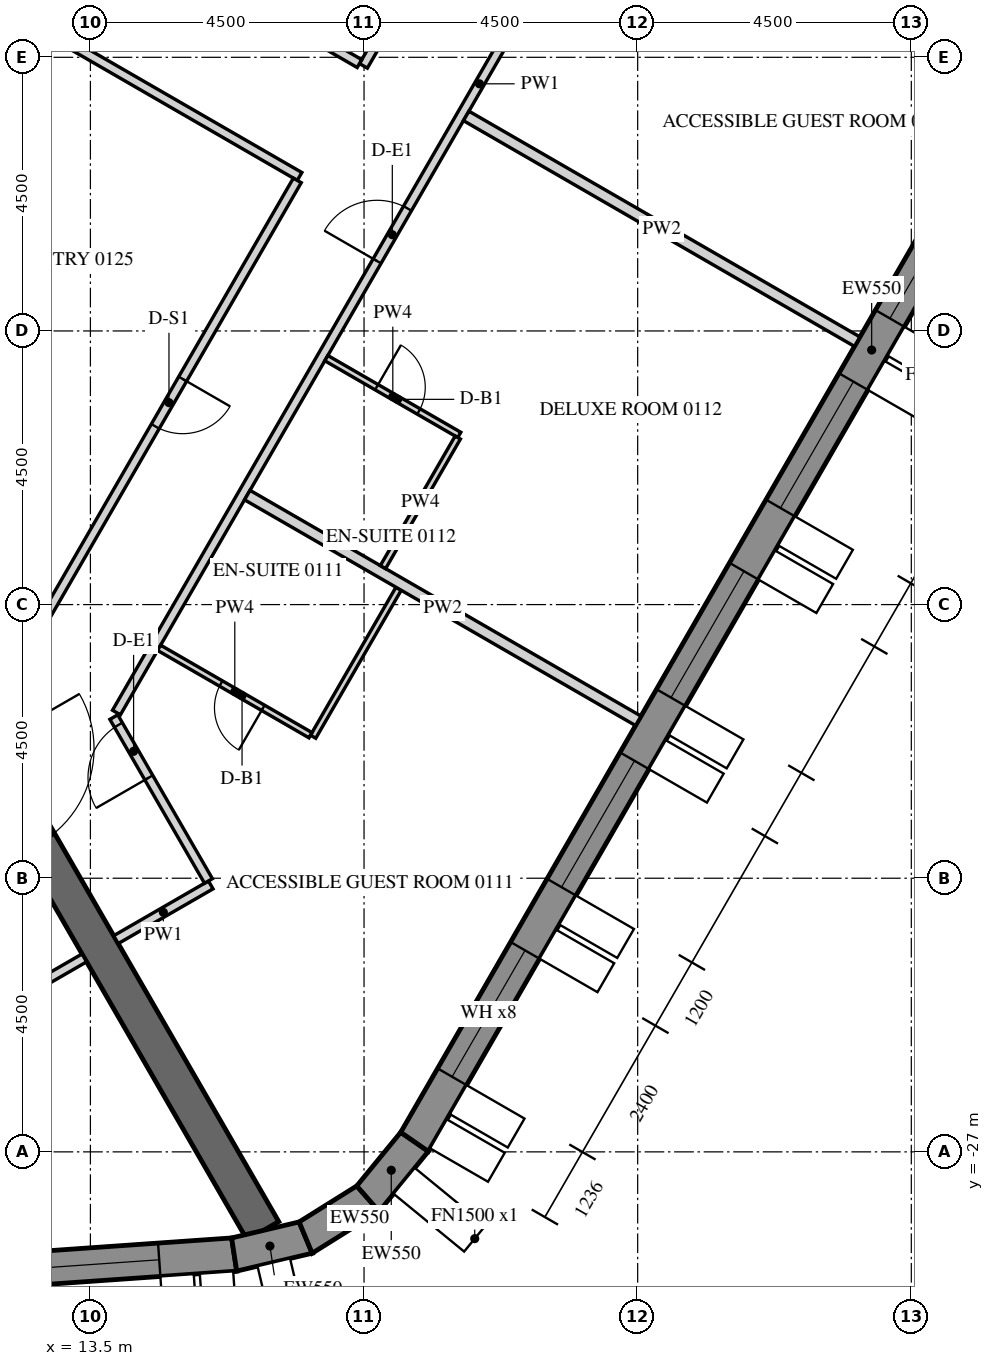
"""IFC4 building model, lengths in metres.
Left out: names, types, materials, properties, quantities, classifications, styles, units other than length and angle.
Written with IfcOpenShell. Run it as: python <this file> out.ifc"""

import sys

from ifc_helpers import new_model, si_unit, direction, frame, frame_2d, origin, place, context, subcontext, project, spatial, polyline, rectangle, outline, extrude, element, fill, save


model = new_model("IFC4")
c1 = context("Model", 3, precision=1e-05, world=origin(), true_north=direction((0.0, 1.0)))
c2 = subcontext(c1, "Body", "Model", "MODEL_VIEW")
j1 = project(units=[si_unit("LENGTHUNIT", "METRE"), si_unit("PLANEANGLEUNIT", "RADIAN")], contexts=[c1])
p1 = place(None, origin())
s1 = spatial("IfcSite", under=j1, at=p1, CompositionType="ELEMENT")
p2 = place(p1, origin())
s2 = spatial("IfcBuilding", under=s1, at=p2, CompositionType="ELEMENT")
p3 = place(p2, frame((0.0, 0.0, 37.5)))
s3 = spatial("IfcBuildingStorey", under=s2, at=p3, CompositionType="ELEMENT", Elevation=37.5)
p4 = place(p3, frame((-14.134, -30.786, -0.15), z_axis=(0.0, 0.0, 1.0), x_axis=(0.997564037441, 0.069756657061, 0.0)))
e1 = element("IfcWall", 1, at=p4, inside=s3, PredefinedType="SOLIDWALL", context=c2, shape_type="SweptSolid", body=[
    extrude(outline(polyline([(-0.026, -0.275), (30.094, -0.275), (30.049, 0.275), (0.026, 0.275), (-0.026, -0.275)])), origin(), (0.0, 0.0, 1.0), 3.9),
])
p5 = place(p4, frame((1.236, 0.0, 1.05)))
e2 = element("IfcOpeningElement", 2, at=p5, cuts=e1, PredefinedType="OPENING", context=c2, shape_type="SweptSolid", body=[
    extrude(rectangle(XDim=2.4, YDim=2.4, at=frame_2d((1.2, 1.2))), frame((0.0, 0.285, 0.0), z_axis=(0.0, -1.0, 0.0), x_axis=(1.0, 0.0, 0.0)), (0.0, 0.0, 1.0), 0.57),
])
p6 = place(p4, frame((4.835, 0.0, 1.05)))
e3 = element("IfcOpeningElement", 3, at=p6, cuts=e1, PredefinedType="OPENING", context=c2, shape_type="SweptSolid", body=[
    extrude(rectangle(XDim=2.4, YDim=2.4, at=frame_2d((1.2, 1.2))), frame((0.0, 0.285, 0.0), z_axis=(0.0, -1.0, 0.0), x_axis=(1.0, 0.0, 0.0)), (0.0, 0.0, 1.0), 0.57),
])
p7 = place(p4, frame((8.436, 0.0, 1.05)))
e4 = element("IfcOpeningElement", 4, at=p7, cuts=e1, PredefinedType="OPENING", context=c2, shape_type="SweptSolid", body=[
    extrude(rectangle(XDim=2.4, YDim=2.4, at=frame_2d((1.2, 1.2))), frame((0.0, 0.285, 0.0), z_axis=(0.0, -1.0, 0.0), x_axis=(1.0, 0.0, 0.0)), (0.0, 0.0, 1.0), 0.57),
])
p8 = place(p4, frame((12.035, 0.0, 1.05)))
e5 = element("IfcOpeningElement", 5, at=p8, cuts=e1, PredefinedType="OPENING", context=c2, shape_type="SweptSolid", body=[
    extrude(rectangle(XDim=2.4, YDim=2.4, at=frame_2d((1.2, 1.2))), frame((0.0, 0.285, 0.0), z_axis=(0.0, -1.0, 0.0), x_axis=(1.0, 0.0, 0.0)), (0.0, 0.0, 1.0), 0.57),
])
p9 = place(p4, frame((15.635, 0.0, 1.05)))
e6 = element("IfcOpeningElement", 6, at=p9, cuts=e1, PredefinedType="OPENING", context=c2, shape_type="SweptSolid", body=[
    extrude(rectangle(XDim=2.4, YDim=2.4, at=frame_2d((1.2, 1.2))), frame((0.0, 0.285, 0.0), z_axis=(0.0, -1.0, 0.0), x_axis=(1.0, 0.0, 0.0)), (0.0, 0.0, 1.0), 0.57),
])
p10 = place(p4, frame((19.236, 0.0, 1.05)))
e7 = element("IfcOpeningElement", 7, at=p10, cuts=e1, PredefinedType="OPENING", context=c2, shape_type="SweptSolid", body=[
    extrude(rectangle(XDim=2.4, YDim=2.4, at=frame_2d((1.2, 1.2))), frame((0.0, 0.285, 0.0), z_axis=(0.0, -1.0, 0.0), x_axis=(1.0, 0.0, 0.0)), (0.0, 0.0, 1.0), 0.57),
])
p11 = place(p4, frame((22.835, 0.0, 1.05)))
e8 = element("IfcOpeningElement", 8, at=p11, cuts=e1, PredefinedType="OPENING", context=c2, shape_type="SweptSolid", body=[
    extrude(rectangle(XDim=2.4, YDim=2.4, at=frame_2d((1.2, 1.2))), frame((0.0, 0.285, 0.0), z_axis=(0.0, -1.0, 0.0), x_axis=(1.0, 0.0, 0.0)), (0.0, 0.0, 1.0), 0.57),
])
p12 = place(p4, frame((26.436, 0.0, 1.05)))
e9 = element("IfcOpeningElement", 9, at=p12, cuts=e1, PredefinedType="OPENING", context=c2, shape_type="SweptSolid", body=[
    extrude(rectangle(XDim=2.4, YDim=2.4, at=frame_2d((1.2, 1.2))), frame((0.0, 0.285, 0.0), z_axis=(0.0, -1.0, 0.0), x_axis=(1.0, 0.0, 0.0)), (0.0, 0.0, 1.0), 0.57),
])
p13 = place(p3, frame((15.864, -28.688, -0.15), z_axis=(0.0, 0.0, 1.0), x_axis=(0.973063591128, 0.230536868247, 0.0)))
e10 = element("IfcWall", 10, at=p13, inside=s3, PredefinedType="SOLIDWALL", context=c2, shape_type="SweptSolid", body=[
    extrude(outline(polyline([(-0.022, -0.275), (1.253, -0.275), (1.163, 0.275), (0.022, 0.275), (-0.022, -0.275)])), origin(), (0.0, 0.0, 1.0), 3.9),
])
p14 = place(p3, frame((17.04, -28.41, -0.15), z_axis=(0.0, 0.0, 1.0), x_axis=(0.847952888306, 0.530071598195, 0.0)))
e11 = element("IfcWall", 11, at=p14, inside=s3, PredefinedType="SOLIDWALL", context=c2, shape_type="SweptSolid", body=[
    extrude(outline(polyline([(-0.045, -0.275), (1.253, -0.275), (1.163, 0.275), (0.045, 0.275), (-0.045, -0.275)])), origin(), (0.0, 0.0, 1.0), 3.9),
])
p15 = place(p3, frame((18.064, -27.769, -0.15), z_axis=(0.0, 0.0, 1.0), x_axis=(0.633842757806, 0.773461930787, 0.0)))
e12 = element("IfcWall", 12, at=p15, inside=s3, PredefinedType="SOLIDWALL", context=c2, shape_type="SweptSolid", body=[
    extrude(outline(polyline([(-0.045, -0.275), (1.231, -0.275), (1.186, 0.275), (0.045, 0.275), (-0.045, -0.275)])), origin(), (0.0, 0.0, 1.0), 3.9),
])
p16 = place(p3, frame((18.83, -26.835, -0.15), z_axis=(0.0, 0.0, 1.0), x_axis=(0.500003800416, 0.866023209602, 0.0)))
e13 = element("IfcWall", 13, at=p16, inside=s3, PredefinedType="SOLIDWALL", context=c2, shape_type="SweptSolid", body=[
    extrude(outline(polyline([(-0.022, -0.275), (30.097, -0.275), (30.045, 0.275), (0.022, 0.275), (-0.022, -0.275)])), origin(), (0.0, 0.0, 1.0), 3.9),
])
p17 = place(p16, frame((1.236, 0.0, 1.05)))
e14 = element("IfcOpeningElement", 14, at=p17, cuts=e13, PredefinedType="OPENING", context=c2, shape_type="SweptSolid", body=[
    extrude(rectangle(XDim=2.4, YDim=2.4, at=frame_2d((1.2, 1.2))), frame((0.0, 0.285, 0.0), z_axis=(0.0, -1.0, 0.0), x_axis=(1.0, 0.0, 0.0)), (0.0, 0.0, 1.0), 0.57),
])
p18 = place(p16, frame((4.835, 0.0, 1.05)))
e15 = element("IfcOpeningElement", 15, at=p18, cuts=e13, PredefinedType="OPENING", context=c2, shape_type="SweptSolid", body=[
    extrude(rectangle(XDim=2.4, YDim=2.4, at=frame_2d((1.2, 1.2))), frame((0.0, 0.285, 0.0), z_axis=(0.0, -1.0, 0.0), x_axis=(1.0, 0.0, 0.0)), (0.0, 0.0, 1.0), 0.57),
])
p19 = place(p16, frame((8.436, 0.0, 1.05)))
e16 = element("IfcOpeningElement", 16, at=p19, cuts=e13, PredefinedType="OPENING", context=c2, shape_type="SweptSolid", body=[
    extrude(rectangle(XDim=2.4, YDim=2.4, at=frame_2d((1.2, 1.2))), frame((0.0, 0.285, 0.0), z_axis=(0.0, -1.0, 0.0), x_axis=(1.0, 0.0, 0.0)), (0.0, 0.0, 1.0), 0.57),
])
p20 = place(p16, frame((12.035, 0.0, 1.05)))
e17 = element("IfcOpeningElement", 17, at=p20, cuts=e13, PredefinedType="OPENING", context=c2, shape_type="SweptSolid", body=[
    extrude(rectangle(XDim=2.4, YDim=2.4, at=frame_2d((1.2, 1.2))), frame((0.0, 0.285, 0.0), z_axis=(0.0, -1.0, 0.0), x_axis=(1.0, 0.0, 0.0)), (0.0, 0.0, 1.0), 0.57),
])
p21 = place(p16, frame((15.635, 0.0, 1.05)))
e18 = element("IfcOpeningElement", 18, at=p21, cuts=e13, PredefinedType="OPENING", context=c2, shape_type="SweptSolid", body=[
    extrude(rectangle(XDim=2.4, YDim=2.4, at=frame_2d((1.2, 1.2))), frame((0.0, 0.285, 0.0), z_axis=(0.0, -1.0, 0.0), x_axis=(1.0, 0.0, 0.0)), (0.0, 0.0, 1.0), 0.57),
])
p22 = place(p16, frame((19.236, 0.0, 1.05)))
e19 = element("IfcOpeningElement", 19, at=p22, cuts=e13, PredefinedType="OPENING", context=c2, shape_type="SweptSolid", body=[
    extrude(rectangle(XDim=2.4, YDim=2.4, at=frame_2d((1.2, 1.2))), frame((0.0, 0.285, 0.0), z_axis=(0.0, -1.0, 0.0), x_axis=(1.0, 0.0, 0.0)), (0.0, 0.0, 1.0), 0.57),
])
p23 = place(p16, frame((22.835, 0.0, 1.05)))
e20 = element("IfcOpeningElement", 20, at=p23, cuts=e13, PredefinedType="OPENING", context=c2, shape_type="SweptSolid", body=[
    extrude(rectangle(XDim=2.4, YDim=2.4, at=frame_2d((1.2, 1.2))), frame((0.0, 0.285, 0.0), z_axis=(0.0, -1.0, 0.0), x_axis=(1.0, 0.0, 0.0)), (0.0, 0.0, 1.0), 0.57),
])
p24 = place(p16, frame((26.436, 0.0, 1.05)))
e21 = element("IfcOpeningElement", 21, at=p24, cuts=e13, PredefinedType="OPENING", context=c2, shape_type="SweptSolid", body=[
    extrude(rectangle(XDim=2.4, YDim=2.4, at=frame_2d((1.2, 1.2))), frame((0.0, 0.285, 0.0), z_axis=(0.0, -1.0, 0.0), x_axis=(1.0, 0.0, 0.0)), (0.0, 0.0, 1.0), 0.57),
])
p25 = place(p3, frame((7.91, -13.7, -0.15), z_axis=(0.0, 0.0, 1.0), x_axis=(0.499999880136, 0.866025472988, 0.0)))
e22 = element("IfcWall", 22, at=p25, inside=s3, PredefinedType="SHEAR", context=c2, shape_type="SweptSolid", body=[
    extrude(outline(polyline([(-0.173, -0.3), (15.993, -0.3), (15.646, 0.3), (0.173, 0.3), (-0.173, -0.3)])), origin(), (0.0, 0.0, 1.0), 3.9),
])
p26 = place(p25, frame((7.039, 0.0, 0.15)))
e23 = element("IfcOpeningElement", 23, at=p26, cuts=e22, PredefinedType="OPENING", context=c2, shape_type="SweptSolid", body=[
    extrude(rectangle(XDim=1.8, YDim=2.4, at=frame_2d((0.9, 1.2))), frame((0.0, 0.31, 0.0), z_axis=(0.0, -1.0, 0.0), x_axis=(1.0, 0.0, 0.0)), (0.0, 0.0, 1.0), 0.62),
])
p27 = place(p3, frame((8.083, -14.0, -0.15), z_axis=(0.0, 0.0, 1.0), x_axis=(0.499997680643, -0.866026742862, 0.0)))
e24 = element("IfcWall", 24, at=p27, inside=s3, PredefinedType="SHEAR", context=c2, shape_type="SweptSolid", body=[
    extrude(rectangle(XDim=16.509, YDim=0.6, at=frame_2d((8.254, 0.0))), origin(), (0.0, 0.0, 1.0), 3.9),
])
p28 = place(p27, frame((7.354, 0.0, 0.15)))
e25 = element("IfcOpeningElement", 25, at=p28, cuts=e24, PredefinedType="OPENING", context=c2, shape_type="SweptSolid", body=[
    extrude(rectangle(XDim=1.8, YDim=2.4, at=frame_2d((0.9, 1.2))), frame((0.0, 0.31, 0.0), z_axis=(0.0, -1.0, 0.0), x_axis=(1.0, 0.0, 0.0)), (0.0, 0.0, 1.0), 0.62),
])
p29 = place(p3, frame((11.906, -24.673, 0.0), z_axis=(0.0, 0.0, 1.0), x_axis=(0.866013532718, 0.500020560727, 0.0)))
e26 = element("IfcWall", 26, at=p29, inside=s3, PredefinedType="PARTITIONING", context=c2, shape_type="SweptSolid", body=[
    extrude(rectangle(XDim=1.725, YDim=0.15, at=frame_2d((0.863, 0.0))), origin(), (0.0, 0.0, 1.0), 2.988),
])
p30 = place(p3, frame((13.92, -23.51, 0.0), z_axis=(0.0, 0.0, 1.0), x_axis=(0.866047807691, 0.499961193289, 0.0)))
e27 = element("IfcWall", 27, at=p30, inside=s3, PredefinedType="PARTITIONING", context=c2, shape_type="SweptSolid", body=[
    extrude(rectangle(XDim=1.8, YDim=0.15, at=frame_2d((0.9, 0.0))), origin(), (0.0, 0.0, 1.0), 2.988),
])
p31 = place(p3, frame((15.441, -22.545, 0.0), z_axis=(0.0, 0.0, 1.0), x_axis=(-0.500037089193, 0.86600398927, 0.0)))
e28 = element("IfcWall", 28, at=p31, inside=s3, PredefinedType="PARTITIONING", context=c2, shape_type="SweptSolid", body=[
    extrude(rectangle(XDim=3.112, YDim=0.15, at=frame_2d((1.556, 0.0))), origin(), (0.0, 0.0, 1.0), 2.988),
])
p32 = place(p31, frame((1.962, 0.0, 0.0)))
e29 = element("IfcOpeningElement", 29, at=p32, cuts=e28, PredefinedType="OPENING", context=c2, shape_type="SweptSolid", body=[
    extrude(rectangle(XDim=1.0, YDim=2.1, at=frame_2d((0.5, 1.05))), frame((0.0, 0.085, 0.0), z_axis=(0.0, -1.0, 0.0), x_axis=(1.0, 0.0, 0.0)), (0.0, 0.0, 1.0), 0.17),
])
p33 = place(p3, frame((13.928, -19.775, 0.0), z_axis=(0.0, 0.0, 1.0), x_axis=(0.50000450071, 0.866022805283, 0.0)))
e30 = element("IfcWall", 30, at=p33, inside=s3, PredefinedType="PARTITIONING", context=c2, shape_type="SweptSolid", body=[
    extrude(rectangle(XDim=23.877, YDim=0.15, at=frame_2d((11.938, 0.0))), origin(), (0.0, 0.0, 1.0), 2.988),
])
p34 = place(p33, frame((8.573, 0.0, 0.0)))
e31 = element("IfcOpeningElement", 31, at=p34, cuts=e30, PredefinedType="OPENING", context=c2, shape_type="SweptSolid", body=[
    extrude(rectangle(XDim=1.0, YDim=2.1, at=frame_2d((0.5, 1.05))), frame((0.0, 0.085, 0.0), z_axis=(0.0, -1.0, 0.0), x_axis=(1.0, 0.0, 0.0)), (0.0, 0.0, 1.0), 0.17),
])
p35 = place(p33, frame((13.022, 0.0, 0.0)))
e32 = element("IfcOpeningElement", 32, at=p35, cuts=e30, PredefinedType="OPENING", context=c2, shape_type="SweptSolid", body=[
    extrude(rectangle(XDim=1.0, YDim=2.1, at=frame_2d((0.5, 1.05))), frame((0.0, 0.085, 0.0), z_axis=(0.0, -1.0, 0.0), x_axis=(1.0, 0.0, 0.0)), (0.0, 0.0, 1.0), 0.17),
])
p36 = place(p33, frame((21.925, 0.0, 0.0)))
e33 = element("IfcOpeningElement", 33, at=p36, cuts=e30, PredefinedType="OPENING", context=c2, shape_type="SweptSolid", body=[
    extrude(rectangle(XDim=1.0, YDim=2.1, at=frame_2d((0.5, 1.05))), frame((0.0, 0.085, 0.0), z_axis=(0.0, -1.0, 0.0), x_axis=(1.0, 0.0, 0.0)), (0.0, 0.0, 1.0), 0.17),
])
p37 = place(p3, frame((23.704, 0.757, 0.0), z_axis=(0.0, 0.0, 1.0), x_axis=(-0.500010297365, -0.866019458516, 0.0)))
e34 = element("IfcWall", 34, at=p37, inside=s3, PredefinedType="PARTITIONING", context=c2, shape_type="SweptSolid", body=[
    extrude(rectangle(XDim=11.429, YDim=0.15, at=frame_2d((5.714, 0.0))), origin(), (0.0, 0.0, 1.0), 2.988),
])
p38 = place(p37, frame((5.264, 0.0, 0.0)))
e35 = element("IfcOpeningElement", 35, at=p38, cuts=e34, PredefinedType="OPENING", context=c2, shape_type="SweptSolid", body=[
    extrude(rectangle(XDim=0.9, YDim=2.1, at=frame_2d((0.45, 1.05))), frame((0.0, 0.085, 0.0), z_axis=(0.0, -1.0, 0.0), x_axis=(1.0, 0.0, 0.0)), (0.0, 0.0, 1.0), 0.17),
])
p39 = place(p3, frame((17.925, -9.103, 0.0), z_axis=(0.0, 0.0, 1.0), x_axis=(-0.866013586754, 0.500020467139, 0.0)))
e36 = element("IfcWall", 36, at=p39, inside=s3, PredefinedType="PARTITIONING", context=c2, shape_type="SweptSolid", body=[
    extrude(rectangle(XDim=6.075, YDim=0.15, at=frame_2d((3.038, 0.0))), origin(), (0.0, 0.0, 1.0), 2.988),
])
p40 = place(p3, frame((11.614, -7.884, 0.0), z_axis=(0.0, 0.0, 1.0), x_axis=(0.866033542371, -0.499985903289, 0.0)))
e37 = element("IfcWall", 37, at=p40, inside=s3, PredefinedType="PARTITIONING", context=c2, shape_type="SweptSolid", body=[
    extrude(rectangle(XDim=6.15, YDim=0.15, at=frame_2d((3.075, 0.0))), origin(), (0.0, 0.0, 1.0), 2.988),
])
p41 = place(p3, frame((16.902, -11.024, 0.0), z_axis=(0.0, 0.0, 1.0), x_axis=(-0.499999527968, -0.866025676312, 0.0)))
e38 = element("IfcWall", 38, at=p41, inside=s3, PredefinedType="PARTITIONING", context=c2, shape_type="SweptSolid", body=[
    extrude(rectangle(XDim=8.441, YDim=0.15, at=frame_2d((4.22, 0.0))), origin(), (0.0, 0.0, 1.0), 2.988),
])
p42 = place(p41, frame((3.771, 0.0, 0.0)))
e39 = element("IfcOpeningElement", 39, at=p42, cuts=e38, PredefinedType="OPENING", context=c2, shape_type="SweptSolid", body=[
    extrude(rectangle(XDim=0.9, YDim=2.1, at=frame_2d((0.45, 1.05))), frame((0.0, 0.085, 0.0), z_axis=(0.0, -1.0, 0.0), x_axis=(1.0, 0.0, 0.0)), (0.0, 0.0, 1.0), 0.17),
])
p43 = place(p3, frame((18.568, -17.74, 0.0), z_axis=(0.0, 0.0, 1.0), x_axis=(-0.499998209175, -0.866026437715, 0.0)))
e40 = element("IfcWall", 40, at=p43, inside=s3, PredefinedType="PARTITIONING", context=c2, shape_type="SweptSolid", body=[
    extrude(rectangle(XDim=2.81, YDim=0.1, at=frame_2d((1.405, 0.0))), origin(), (0.0, 0.0, 1.0), 2.988),
])
p44 = place(p3, frame((17.12, -20.148, 0.0), z_axis=(0.0, 0.0, 1.0), x_axis=(-0.866039941686, 0.499974818771, 0.0)))
e41 = element("IfcWall", 41, at=p44, inside=s3, PredefinedType="PARTITIONING", context=c2, shape_type="SweptSolid", body=[
    extrude(rectangle(XDim=2.875, YDim=0.1, at=frame_2d((1.438, 0.0))), origin(), (0.0, 0.0, 1.0), 2.988),
])
p45 = place(p44, frame((0.9, 0.0, 0.0)))
e42 = element("IfcOpeningElement", 42, at=p45, cuts=e41, PredefinedType="OPENING", context=c2, shape_type="SweptSolid", body=[
    extrude(rectangle(XDim=0.8, YDim=2.1, at=frame_2d((0.4, 1.05))), frame((0.0, 0.06, 0.0), z_axis=(0.0, -1.0, 0.0), x_axis=(1.0, 0.0, 0.0)), (0.0, 0.0, 1.0), 0.12),
])
p46 = place(p3, frame((22.51, -19.912, 0.0), z_axis=(0.0, 0.0, 1.0), x_axis=(-0.866014745021, 0.500018461065, 0.0)))
e43 = element("IfcWall", 43, at=p46, inside=s3, PredefinedType="PARTITIONING", context=c2, shape_type="SweptSolid", body=[
    extrude(rectangle(XDim=7.425, YDim=0.18, at=frame_2d((3.712, 0.0))), origin(), (0.0, 0.0, 1.0), 2.988),
])
p47 = place(p3, frame((17.38, -13.948, 0.0), z_axis=(0.0, 0.0, 1.0), x_axis=(0.866039067339, -0.499976333282, 0.0)))
e44 = element("IfcWall", 44, at=p47, inside=s3, PredefinedType="PARTITIONING", context=c2, shape_type="SweptSolid", body=[
    extrude(rectangle(XDim=2.525, YDim=0.1, at=frame_2d((1.262, 0.0))), origin(), (0.0, 0.0, 1.0), 2.988),
])
p48 = place(p47, frame((0.955, 0.0, 0.0)))
e45 = element("IfcOpeningElement", 45, at=p48, cuts=e44, PredefinedType="OPENING", context=c2, shape_type="SweptSolid", body=[
    extrude(rectangle(XDim=0.8, YDim=2.1, at=frame_2d((0.4, 1.05))), frame((0.0, 0.06, 0.0), z_axis=(0.0, -1.0, 0.0), x_axis=(1.0, 0.0, 0.0)), (0.0, 0.0, 1.0), 0.12),
])
p49 = place(p3, frame((19.542, -15.253, 0.0), z_axis=(0.0, 0.0, 1.0), x_axis=(-0.500003092839, -0.866023618125, 0.0)))
e46 = element("IfcWall", 46, at=p49, inside=s3, PredefinedType="PARTITIONING", context=c2, shape_type="SweptSolid", body=[
    extrude(rectangle(XDim=2.46, YDim=0.1, at=frame_2d((1.23, 0.0))), origin(), (0.0, 0.0, 1.0), 2.988),
])
p50 = place(p3, frame((26.11, -13.676, 0.0), z_axis=(0.0, 0.0, 1.0), x_axis=(-0.866014745021, 0.500018461065, 0.0)))
e47 = element("IfcWall", 47, at=p50, inside=s3, PredefinedType="PARTITIONING", context=c2, shape_type="SweptSolid", body=[
    extrude(rectangle(XDim=7.425, YDim=0.18, at=frame_2d((3.712, 0.0))), origin(), (0.0, 0.0, 1.0), 2.988),
])
p51 = place(p12, frame((0.0, 0.205, 0.0)))
e48 = element("IfcWindow", 48, at=p51, inside=s3, PartitioningType="DOUBLE_PANEL_VERTICAL", PredefinedType="WINDOW", context=c2, shape_type="SweptSolid", body=[
    extrude(rectangle(XDim=2.4, YDim=2.4, at=frame_2d((1.2, 1.2))), frame((0.0, 0.03, 0.0), z_axis=(0.0, -1.0, 0.0), x_axis=(1.0, 0.0, 0.0)), (0.0, 0.0, 1.0), 0.06),
])
fill(e9, e48)
p52 = place(p17, frame((0.0, 0.205, 0.0)))
e49 = element("IfcWindow", 49, at=p52, inside=s3, PartitioningType="DOUBLE_PANEL_VERTICAL", PredefinedType="WINDOW", context=c2, shape_type="SweptSolid", body=[
    extrude(rectangle(XDim=2.4, YDim=2.4, at=frame_2d((1.2, 1.2))), frame((0.0, 0.03, 0.0), z_axis=(0.0, -1.0, 0.0), x_axis=(1.0, 0.0, 0.0)), (0.0, 0.0, 1.0), 0.06),
])
fill(e14, e49)
p53 = place(p18, frame((0.0, 0.205, 0.0)))
e50 = element("IfcWindow", 50, at=p53, inside=s3, PartitioningType="DOUBLE_PANEL_VERTICAL", PredefinedType="WINDOW", context=c2, shape_type="SweptSolid", body=[
    extrude(rectangle(XDim=2.4, YDim=2.4, at=frame_2d((1.2, 1.2))), frame((0.0, 0.03, 0.0), z_axis=(0.0, -1.0, 0.0), x_axis=(1.0, 0.0, 0.0)), (0.0, 0.0, 1.0), 0.06),
])
fill(e15, e50)
p54 = place(p19, frame((0.0, 0.205, 0.0)))
e51 = element("IfcWindow", 51, at=p54, inside=s3, PartitioningType="DOUBLE_PANEL_VERTICAL", PredefinedType="WINDOW", context=c2, shape_type="SweptSolid", body=[
    extrude(rectangle(XDim=2.4, YDim=2.4, at=frame_2d((1.2, 1.2))), frame((0.0, 0.03, 0.0), z_axis=(0.0, -1.0, 0.0), x_axis=(1.0, 0.0, 0.0)), (0.0, 0.0, 1.0), 0.06),
])
fill(e16, e51)
p55 = place(p20, frame((0.0, 0.205, 0.0)))
e52 = element("IfcWindow", 52, at=p55, inside=s3, PartitioningType="DOUBLE_PANEL_VERTICAL", PredefinedType="WINDOW", context=c2, shape_type="SweptSolid", body=[
    extrude(rectangle(XDim=2.4, YDim=2.4, at=frame_2d((1.2, 1.2))), frame((0.0, 0.03, 0.0), z_axis=(0.0, -1.0, 0.0), x_axis=(1.0, 0.0, 0.0)), (0.0, 0.0, 1.0), 0.06),
])
fill(e17, e52)
p56 = place(p21, frame((0.0, 0.205, 0.0)))
e53 = element("IfcWindow", 53, at=p56, inside=s3, PartitioningType="DOUBLE_PANEL_VERTICAL", PredefinedType="WINDOW", context=c2, shape_type="SweptSolid", body=[
    extrude(rectangle(XDim=2.4, YDim=2.4, at=frame_2d((1.2, 1.2))), frame((0.0, 0.03, 0.0), z_axis=(0.0, -1.0, 0.0), x_axis=(1.0, 0.0, 0.0)), (0.0, 0.0, 1.0), 0.06),
])
fill(e18, e53)
p57 = place(p32, origin())
e54 = element("IfcDoor", 54, at=p57, inside=s3, OperationType="SINGLE_SWING_LEFT", PredefinedType="DOOR", context=c2, shape_type="SweptSolid", body=[
    extrude(rectangle(XDim=1.0, YDim=2.1, at=frame_2d((0.5, 1.05))), frame((0.0, 0.025, 0.0), z_axis=(0.0, -1.0, 0.0), x_axis=(1.0, 0.0, 0.0)), (0.0, 0.0, 1.0), 0.05),
])
fill(e29, e54)
p58 = place(p45, origin())
e55 = element("IfcDoor", 55, at=p58, inside=s3, OperationType="SINGLE_SWING_RIGHT", PredefinedType="DOOR", context=c2, shape_type="SweptSolid", body=[
    extrude(rectangle(XDim=0.8, YDim=2.1, at=frame_2d((0.4, 1.05))), frame((0.0, 0.025, 0.0), z_axis=(0.0, -1.0, 0.0), x_axis=(1.0, 0.0, 0.0)), (0.0, 0.0, 1.0), 0.05),
])
fill(e42, e55)
p59 = place(p34, origin())
e56 = element("IfcDoor", 56, at=p59, inside=s3, OperationType="SINGLE_SWING_LEFT", PredefinedType="DOOR", context=c2, shape_type="SweptSolid", body=[
    extrude(rectangle(XDim=1.0, YDim=2.1, at=frame_2d((0.5, 1.05))), frame((0.0, 0.025, 0.0), z_axis=(0.0, -1.0, 0.0), x_axis=(1.0, 0.0, 0.0)), (0.0, 0.0, 1.0), 0.05),
])
fill(e31, e56)
p60 = place(p48, origin())
e57 = element("IfcDoor", 57, at=p60, inside=s3, OperationType="SINGLE_SWING_LEFT", PredefinedType="DOOR", context=c2, shape_type="SweptSolid", body=[
    extrude(rectangle(XDim=0.8, YDim=2.1, at=frame_2d((0.4, 1.05))), frame((0.0, 0.025, 0.0), z_axis=(0.0, -1.0, 0.0), x_axis=(1.0, 0.0, 0.0)), (0.0, 0.0, 1.0), 0.05),
])
fill(e45, e57)
p61 = place(p42, origin())
e58 = element("IfcDoor", 58, at=p61, inside=s3, OperationType="SINGLE_SWING_RIGHT", PredefinedType="DOOR", context=c2, shape_type="SweptSolid", body=[
    extrude(rectangle(XDim=0.9, YDim=2.1, at=frame_2d((0.45, 1.05))), frame((0.0, 0.025, 0.0), z_axis=(0.0, -1.0, 0.0), x_axis=(1.0, 0.0, 0.0)), (0.0, 0.0, 1.0), 0.05),
])
fill(e39, e58)
save(model, sys.argv[1])
